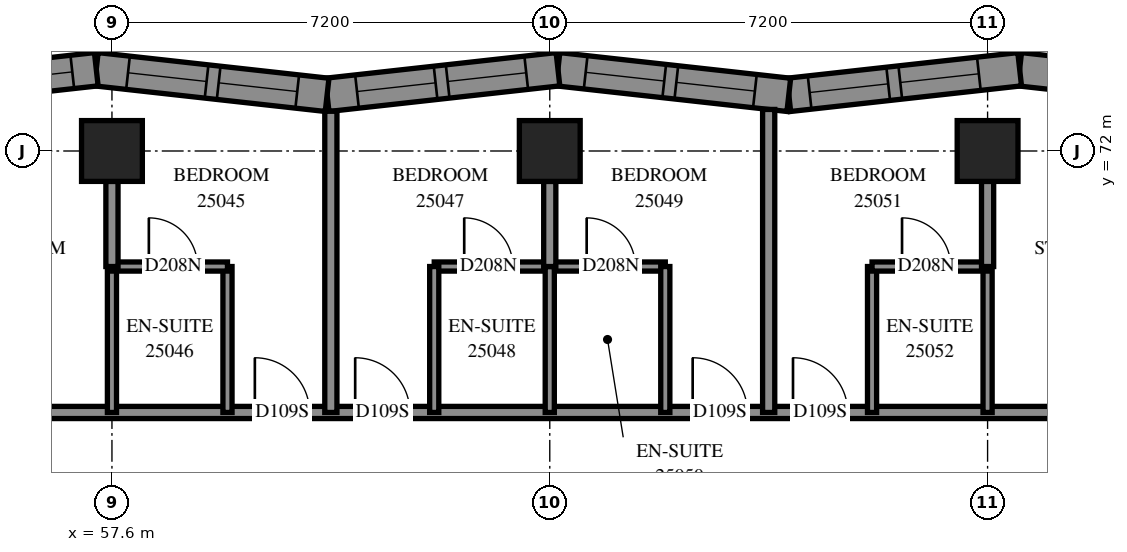
"""IFC4 building model, lengths in metres.
Left out: names, types, materials, properties, quantities, classifications, styles, units other than length and angle.
Written with IfcOpenShell. Run it as: python <this file> out.ifc"""

import sys

from ifc_helpers import new_model, si_unit, direction, frame, frame_2d, origin, origin_2d, place, context, subcontext, project, spatial, polyline, rectangle, outline, extrude, element, fill, save


model = new_model("IFC4")
c1 = context("Model", 3, precision=1e-05, world=origin(), true_north=direction((0.0, 1.0)))
c2 = subcontext(c1, "Body", "Model", "MODEL_VIEW")
j1 = project(units=[si_unit("LENGTHUNIT", "METRE"), si_unit("PLANEANGLEUNIT", "RADIAN")], contexts=[c1])
p1 = place(None, origin())
s1 = spatial("IfcSite", under=j1, at=p1, CompositionType="ELEMENT")
p2 = place(p1, origin())
s2 = spatial("IfcBuilding", under=s1, at=p2, CompositionType="ELEMENT")
p3 = place(p2, frame((0.0, 0.0, 94.8)))
s3 = spatial("IfcBuildingStorey", under=s2, at=p3, CompositionType="ELEMENT", Elevation=94.8)
for number, where, z_axis, x_axis in (
    (1, (57.6, 72.0, 0.0), (0.0, 0.0, 1.0), (1.0, 0.0, 0.0)),
    (2, (64.8, 72.0, 0.0), (0.0, 0.0, 1.0), (1.0, 0.0, 0.0)),
    (3, (72.0, 72.0, 0.0), (0.0, 0.0, 1.0), (1.0, 0.0, 0.0)),
):
    element("IfcColumn", number, at=place(p3, frame(where, z_axis=z_axis, x_axis=x_axis)), inside=s3, PredefinedType="COLUMN", context=c2, shape_type="SweptSolid", body=[
        extrude(rectangle(XDim=1.0, YDim=1.0, at=origin_2d()), origin(), (0.0, 0.0, 1.0), 3.1),
    ])
p4 = place(p3, frame((76.345, 72.921, 0.0), z_axis=(0.0, 0.0, 1.0), x_axis=(-0.9939087915, 0.1102057815, 0.0)))
e4 = element("IfcWall", 4, at=p4, inside=s3, PredefinedType="SOLIDWALL", context=c2, shape_type="SweptSolid", body=[
    extrude(outline(polyline([(0.052, -0.275), (3.872, -0.275), (3.811, 0.275), (-0.052, 0.275), (0.052, -0.275)])), origin(), (0.0, 0.0, 1.0), 3.1),
])
p5 = place(p4, frame((1.58, 0.0, 0.5)))
e5 = element("IfcOpeningElement", 5, at=p5, cuts=e4, PredefinedType="OPENING", context=c2, shape_type="SweptSolid", body=[
    extrude(rectangle(XDim=1.2, YDim=2.45, at=frame_2d((0.6, 1.225))), frame((0.0, 0.285, 0.0), z_axis=(0.0, -1.0, 0.0), x_axis=(1.0, 0.0, 0.0)), (0.0, 0.0, 1.0), 0.57),
])
p6 = place(p3, frame((72.527, 73.344, 0.0), z_axis=(0.0, 0.0, 1.0), x_axis=(-0.99390702, -0.1102217568, 0.0)))
e6 = element("IfcWall", 6, at=p6, inside=s3, PredefinedType="SOLIDWALL", context=c2, shape_type="SweptSolid", body=[
    extrude(outline(polyline([(-0.03, -0.275), (3.789, -0.275), (3.85, 0.275), (0.03, 0.275), (-0.03, -0.275)])), origin(), (0.0, 0.0, 1.0), 3.1),
])
p7 = place(p6, frame((0.675, 0.0, 0.5)))
e7 = element("IfcOpeningElement", 7, at=p7, cuts=e6, PredefinedType="OPENING", context=c2, shape_type="SweptSolid", body=[
    extrude(rectangle(XDim=1.3, YDim=2.45, at=frame_2d((0.65, 1.225))), frame((0.0, 0.285, 0.0), z_axis=(0.0, -1.0, 0.0), x_axis=(1.0, 0.0, 0.0)), (0.0, 0.0, 1.0), 0.57),
])
p8 = place(p6, frame((2.175, 0.0, 0.5)))
e8 = element("IfcOpeningElement", 8, at=p8, cuts=e6, PredefinedType="OPENING", context=c2, shape_type="SweptSolid", body=[
    extrude(rectangle(XDim=1.3, YDim=2.45, at=frame_2d((0.65, 1.225))), frame((0.0, 0.285, 0.0), z_axis=(0.0, -1.0, 0.0), x_axis=(1.0, 0.0, 0.0)), (0.0, 0.0, 1.0), 0.57),
])
p9 = place(p3, frame((68.731, 72.923, 0.0), z_axis=(0.0, 0.0, 1.0), x_axis=(-0.99390702, 0.1102217568, 0.0)))
e9 = element("IfcWall", 9, at=p9, inside=s3, PredefinedType="SOLIDWALL", context=c2, shape_type="SweptSolid", body=[
    extrude(outline(polyline([(0.03, -0.275), (3.85, -0.275), (3.789, 0.275), (-0.03, 0.275), (0.03, -0.275)])), origin(), (0.0, 0.0, 1.0), 3.1),
])
p10 = place(p9, frame((0.561, 0.0, 0.5)))
e10 = element("IfcOpeningElement", 10, at=p10, cuts=e9, PredefinedType="OPENING", context=c2, shape_type="SweptSolid", body=[
    extrude(rectangle(XDim=1.3, YDim=2.45, at=frame_2d((0.65, 1.225))), frame((0.0, 0.285, 0.0), z_axis=(0.0, -1.0, 0.0), x_axis=(1.0, 0.0, 0.0)), (0.0, 0.0, 1.0), 0.57),
])
p11 = place(p9, frame((2.061, 0.0, 0.5)))
e11 = element("IfcOpeningElement", 11, at=p11, cuts=e9, PredefinedType="OPENING", context=c2, shape_type="SweptSolid", body=[
    extrude(rectangle(XDim=1.3, YDim=2.45, at=frame_2d((0.65, 1.225))), frame((0.0, 0.285, 0.0), z_axis=(0.0, -1.0, 0.0), x_axis=(1.0, 0.0, 0.0)), (0.0, 0.0, 1.0), 0.57),
])
p12 = place(p3, frame((64.935, 73.344, 0.0), z_axis=(0.0, 0.0, 1.0), x_axis=(-0.993907338, -0.1102188888, 0.0)))
e12 = element("IfcWall", 12, at=p12, inside=s3, PredefinedType="SOLIDWALL", context=c2, shape_type="SweptSolid", body=[
    extrude(outline(polyline([(-0.03, -0.275), (3.789, -0.275), (3.85, 0.275), (0.03, 0.275), (-0.03, -0.275)])), origin(), (0.0, 0.0, 1.0), 3.1),
])
p13 = place(p12, frame((0.525, 0.0, 0.5)))
e13 = element("IfcOpeningElement", 13, at=p13, cuts=e12, PredefinedType="OPENING", context=c2, shape_type="SweptSolid", body=[
    extrude(rectangle(XDim=1.3, YDim=2.45, at=frame_2d((0.65, 1.225))), frame((0.0, 0.285, 0.0), z_axis=(0.0, -1.0, 0.0), x_axis=(1.0, 0.0, 0.0)), (0.0, 0.0, 1.0), 0.57),
])
p14 = place(p12, frame((2.025, 0.0, 0.5)))
e14 = element("IfcOpeningElement", 14, at=p14, cuts=e12, PredefinedType="OPENING", context=c2, shape_type="SweptSolid", body=[
    extrude(rectangle(XDim=1.3, YDim=2.45, at=frame_2d((0.65, 1.225))), frame((0.0, 0.285, 0.0), z_axis=(0.0, -1.0, 0.0), x_axis=(1.0, 0.0, 0.0)), (0.0, 0.0, 1.0), 0.57),
])
p15 = place(p3, frame((61.138, 72.923, 0.0), z_axis=(0.0, 0.0, 1.0), x_axis=(-0.99390702, 0.1102217568, 0.0)))
e15 = element("IfcWall", 15, at=p15, inside=s3, PredefinedType="SOLIDWALL", context=c2, shape_type="SweptSolid", body=[
    extrude(outline(polyline([(0.03, -0.275), (3.85, -0.275), (3.789, 0.275), (-0.03, 0.275), (0.03, -0.275)])), origin(), (0.0, 0.0, 1.0), 3.1),
])
p16 = place(p15, frame((0.494, 0.0, 0.5)))
e16 = element("IfcOpeningElement", 16, at=p16, cuts=e15, PredefinedType="OPENING", context=c2, shape_type="SweptSolid", body=[
    extrude(rectangle(XDim=1.3, YDim=2.45, at=frame_2d((0.65, 1.225))), frame((0.0, 0.285, 0.0), z_axis=(0.0, -1.0, 0.0), x_axis=(1.0, 0.0, 0.0)), (0.0, 0.0, 1.0), 0.57),
])
p17 = place(p15, frame((1.994, 0.0, 0.5)))
e17 = element("IfcOpeningElement", 17, at=p17, cuts=e15, PredefinedType="OPENING", context=c2, shape_type="SweptSolid", body=[
    extrude(rectangle(XDim=1.3, YDim=2.45, at=frame_2d((0.65, 1.225))), frame((0.0, 0.285, 0.0), z_axis=(0.0, -1.0, 0.0), x_axis=(1.0, 0.0, 0.0)), (0.0, 0.0, 1.0), 0.57),
])
p18 = place(p3, frame((57.342, 73.344, 0.0), z_axis=(0.0, 0.0, 1.0), x_axis=(-0.99390702, -0.1102217568, 0.0)))
e18 = element("IfcWall", 18, at=p18, inside=s3, PredefinedType="SOLIDWALL", context=c2, shape_type="SweptSolid", body=[
    extrude(outline(polyline([(-0.03, -0.275), (3.789, -0.275), (3.85, 0.275), (0.03, 0.275), (-0.03, -0.275)])), origin(), (0.0, 0.0, 1.0), 3.1),
])
p19 = place(p18, frame((0.397, 0.0, 0.5)))
e19 = element("IfcOpeningElement", 19, at=p19, cuts=e18, PredefinedType="OPENING", context=c2, shape_type="SweptSolid", body=[
    extrude(rectangle(XDim=1.3, YDim=2.45, at=frame_2d((0.65, 1.225))), frame((0.0, 0.285, 0.0), z_axis=(0.0, -1.0, 0.0), x_axis=(1.0, 0.0, 0.0)), (0.0, 0.0, 1.0), 0.57),
])
p20 = place(p18, frame((1.897, 0.0, 0.5)))
e20 = element("IfcOpeningElement", 20, at=p20, cuts=e18, PredefinedType="OPENING", context=c2, shape_type="SweptSolid", body=[
    extrude(rectangle(XDim=1.3, YDim=2.45, at=frame_2d((0.65, 1.225))), frame((0.0, 0.285, 0.0), z_axis=(0.0, -1.0, 0.0), x_axis=(1.0, 0.0, 0.0)), (0.0, 0.0, 1.0), 0.57),
])
p21 = place(p3, frame((54.7, 67.7, 0.0), z_axis=(0.0, 0.0, 1.0), x_axis=(1.0, 0.0, 0.0)))
e21 = element("IfcWall", 21, at=p21, inside=s3, PredefinedType="PARTITIONING", context=c2, shape_type="SweptSolid", body=[
    extrude(rectangle(XDim=20.2, YDim=0.2, at=frame_2d((10.1, 0.0))), origin(), (0.0, 0.0, 1.0), 3.1),
])
p22 = place(p21, frame((5.25, 0.0, 0.0)))
e22 = element("IfcOpeningElement", 22, at=p22, cuts=e21, PredefinedType="OPENING", context=c2, shape_type="SweptSolid", body=[
    extrude(rectangle(XDim=0.9, YDim=2.1, at=frame_2d((0.45, 1.05))), frame((0.0, 0.11, 0.0), z_axis=(0.0, -1.0, 0.0), x_axis=(1.0, 0.0, 0.0)), (0.0, 0.0, 1.0), 0.22),
])
p23 = place(p21, frame((6.9, 0.0, 0.0)))
e23 = element("IfcOpeningElement", 23, at=p23, cuts=e21, PredefinedType="OPENING", context=c2, shape_type="SweptSolid", body=[
    extrude(rectangle(XDim=0.9, YDim=2.1, at=frame_2d((0.45, 1.05))), frame((0.0, 0.11, 0.0), z_axis=(0.0, -1.0, 0.0), x_axis=(1.0, 0.0, 0.0)), (0.0, 0.0, 1.0), 0.22),
])
p24 = place(p21, frame((12.45, 0.0, 0.0)))
e24 = element("IfcOpeningElement", 24, at=p24, cuts=e21, PredefinedType="OPENING", context=c2, shape_type="SweptSolid", body=[
    extrude(rectangle(XDim=0.9, YDim=2.1, at=frame_2d((0.45, 1.05))), frame((0.0, 0.11, 0.0), z_axis=(0.0, -1.0, 0.0), x_axis=(1.0, 0.0, 0.0)), (0.0, 0.0, 1.0), 0.22),
])
p25 = place(p21, frame((14.1, 0.0, 0.0)))
e25 = element("IfcOpeningElement", 25, at=p25, cuts=e21, PredefinedType="OPENING", context=c2, shape_type="SweptSolid", body=[
    extrude(rectangle(XDim=0.9, YDim=2.1, at=frame_2d((0.45, 1.05))), frame((0.0, 0.11, 0.0), z_axis=(0.0, -1.0, 0.0), x_axis=(1.0, 0.0, 0.0)), (0.0, 0.0, 1.0), 0.22),
])
p26 = place(p3, frame((68.4, 67.7, 0.0), z_axis=(0.0, 0.0, 1.0), x_axis=(0.0, 1.0, 0.0)))
e26 = element("IfcWall", 26, at=p26, inside=s3, PredefinedType="PARTITIONING", context=c2, shape_type="SweptSolid", body=[
    extrude(rectangle(XDim=4.983, YDim=0.2, at=frame_2d((2.492, 0.0))), origin(), (0.0, 0.0, 1.0), 3.1),
])
p27 = place(p3, frame((61.2, 67.7, 0.0), z_axis=(0.0, 0.0, 1.0), x_axis=(0.0, 1.0, 0.0)))
e27 = element("IfcWall", 27, at=p27, inside=s3, PredefinedType="PARTITIONING", context=c2, shape_type="SweptSolid", body=[
    extrude(rectangle(XDim=4.954, YDim=0.2, at=frame_2d((2.477, 0.0))), origin(), (0.0, 0.0, 1.0), 3.1),
])
p28 = place(p3, frame((62.9, 70.1, 0.0), z_axis=(0.0, 0.0, 1.0), x_axis=(1.0, 0.0, 0.0)))
e28 = element("IfcWall", 28, at=p28, inside=s3, PredefinedType="PARTITIONING", context=c2, shape_type="SweptSolid", body=[
    extrude(rectangle(XDim=3.8, YDim=0.15, at=frame_2d((1.9, 0.0))), origin(), (0.0, 0.0, 1.0), 3.1),
])
p29 = place(p28, frame((0.493, 0.0, 0.0)))
e29 = element("IfcOpeningElement", 29, at=p29, cuts=e28, PredefinedType="OPENING", context=c2, shape_type="SweptSolid", body=[
    extrude(rectangle(XDim=0.8, YDim=2.1, at=frame_2d((0.4, 1.05))), frame((0.0, 0.085, 0.0), z_axis=(0.0, -1.0, 0.0), x_axis=(1.0, 0.0, 0.0)), (0.0, 0.0, 1.0), 0.17),
])
p30 = place(p28, frame((2.507, 0.0, 0.0)))
e30 = element("IfcOpeningElement", 30, at=p30, cuts=e28, PredefinedType="OPENING", context=c2, shape_type="SweptSolid", body=[
    extrude(rectangle(XDim=0.8, YDim=2.1, at=frame_2d((0.4, 1.05))), frame((0.0, 0.085, 0.0), z_axis=(0.0, -1.0, 0.0), x_axis=(1.0, 0.0, 0.0)), (0.0, 0.0, 1.0), 0.17),
])
for number, where, z_axis, x_axis in (
    (31, (59.5, 67.7, 0.0), (0.0, 0.0, 1.0), (0.0, 1.0, 0.0)),
    (32, (57.6, 67.7, 0.0), (0.0, 0.0, 1.0), (0.0, 1.0, 0.0)),
    (33, (62.9, 67.7, 0.0), (0.0, 0.0, 1.0), (0.0, 1.0, 0.0)),
    (34, (64.8, 67.7, 0.0), (0.0, 0.0, 1.0), (0.0, 1.0, 0.0)),
    (35, (66.7, 67.7, 0.0), (0.0, 0.0, 1.0), (0.0, 1.0, 0.0)),
    (36, (70.1, 67.7, 0.0), (0.0, 0.0, 1.0), (0.0, 1.0, 0.0)),
    (37, (72.0, 67.7, 0.0), (0.0, 0.0, 1.0), (0.0, 1.0, 0.0)),
):
    element("IfcWall", number, at=place(p3, frame(where, z_axis=z_axis, x_axis=x_axis)), inside=s3, PredefinedType="PARTITIONING", context=c2, shape_type="SweptSolid", body=[
        extrude(rectangle(XDim=2.4, YDim=0.15, at=frame_2d((1.2, 0.0))), origin(), (0.0, 0.0, 1.0), 3.1),
    ])
p31 = place(p3, frame((70.1, 70.1, 0.0), z_axis=(0.0, 0.0, 1.0), x_axis=(1.0, 0.0, 0.0)))
e38 = element("IfcWall", 38, at=p31, inside=s3, PredefinedType="PARTITIONING", context=c2, shape_type="SweptSolid", body=[
    extrude(rectangle(XDim=1.9, YDim=0.15, at=frame_2d((0.95, 0.0))), origin(), (0.0, 0.0, 1.0), 3.1),
])
p32 = place(p31, frame((0.493, 0.0, 0.0)))
e39 = element("IfcOpeningElement", 39, at=p32, cuts=e38, PredefinedType="OPENING", context=c2, shape_type="SweptSolid", body=[
    extrude(rectangle(XDim=0.8, YDim=2.1, at=frame_2d((0.4, 1.05))), frame((0.0, 0.085, 0.0), z_axis=(0.0, -1.0, 0.0), x_axis=(1.0, 0.0, 0.0)), (0.0, 0.0, 1.0), 0.17),
])
p33 = place(p3, frame((57.6, 70.1, 0.0), z_axis=(0.0, 0.0, 1.0), x_axis=(1.0, 0.0, 0.0)))
e40 = element("IfcWall", 40, at=p33, inside=s3, PredefinedType="PARTITIONING", context=c2, shape_type="SweptSolid", body=[
    extrude(rectangle(XDim=1.9, YDim=0.15, at=frame_2d((0.95, 0.0))), origin(), (0.0, 0.0, 1.0), 3.1),
])
p34 = place(p33, frame((0.607, 0.0, 0.0)))
e41 = element("IfcOpeningElement", 41, at=p34, cuts=e40, PredefinedType="OPENING", context=c2, shape_type="SweptSolid", body=[
    extrude(rectangle(XDim=0.8, YDim=2.1, at=frame_2d((0.4, 1.05))), frame((0.0, 0.085, 0.0), z_axis=(0.0, -1.0, 0.0), x_axis=(1.0, 0.0, 0.0)), (0.0, 0.0, 1.0), 0.17),
])
for number, where, z_axis, x_axis in (
    (42, (57.6, 70.1, 0.0), (0.0, 0.0, 1.0), (0.0, 1.0, 0.0)),
    (43, (64.8, 70.1, 0.0), (0.0, 0.0, 1.0), (0.0, 1.0, 0.0)),
    (44, (72.0, 70.1, 0.0), (0.0, 0.0, 1.0), (0.0, 1.0, 0.0)),
):
    element("IfcWall", number, at=place(p3, frame(where, z_axis=z_axis, x_axis=x_axis)), inside=s3, PredefinedType="PARTITIONING", context=c2, shape_type="SweptSolid", body=[
        extrude(rectangle(XDim=1.4, YDim=0.2, at=frame_2d((0.7, 0.0))), origin(), (0.0, 0.0, 1.0), 3.1),
    ])
p35 = place(p7, origin())
e45 = element("IfcWindow", 45, at=p35, inside=s3, PartitioningType="SINGLE_PANEL", PredefinedType="WINDOW", context=c2, shape_type="SweptSolid", body=[
    extrude(rectangle(XDim=1.3, YDim=2.45, at=frame_2d((0.65, 1.225))), frame((0.0, 0.155, 0.0), z_axis=(0.0, -1.0, 0.0), x_axis=(1.0, 0.0, 0.0)), (0.0, 0.0, 1.0), 0.06),
])
fill(e7, e45)
p36 = place(p8, origin())
e46 = element("IfcWindow", 46, at=p36, inside=s3, PartitioningType="SINGLE_PANEL", PredefinedType="WINDOW", context=c2, shape_type="SweptSolid", body=[
    extrude(rectangle(XDim=1.3, YDim=2.45, at=frame_2d((0.65, 1.225))), frame((0.0, 0.155, 0.0), z_axis=(0.0, -1.0, 0.0), x_axis=(1.0, 0.0, 0.0)), (0.0, 0.0, 1.0), 0.06),
])
fill(e8, e46)
p37 = place(p10, origin())
e47 = element("IfcWindow", 47, at=p37, inside=s3, PartitioningType="SINGLE_PANEL", PredefinedType="WINDOW", context=c2, shape_type="SweptSolid", body=[
    extrude(rectangle(XDim=1.3, YDim=2.45, at=frame_2d((0.65, 1.225))), frame((0.0, 0.155, 0.0), z_axis=(0.0, -1.0, 0.0), x_axis=(1.0, 0.0, 0.0)), (0.0, 0.0, 1.0), 0.06),
])
fill(e10, e47)
p38 = place(p11, origin())
e48 = element("IfcWindow", 48, at=p38, inside=s3, PartitioningType="SINGLE_PANEL", PredefinedType="WINDOW", context=c2, shape_type="SweptSolid", body=[
    extrude(rectangle(XDim=1.3, YDim=2.45, at=frame_2d((0.65, 1.225))), frame((0.0, 0.155, 0.0), z_axis=(0.0, -1.0, 0.0), x_axis=(1.0, 0.0, 0.0)), (0.0, 0.0, 1.0), 0.06),
])
fill(e11, e48)
p39 = place(p13, origin())
e49 = element("IfcWindow", 49, at=p39, inside=s3, PartitioningType="SINGLE_PANEL", PredefinedType="WINDOW", context=c2, shape_type="SweptSolid", body=[
    extrude(rectangle(XDim=1.3, YDim=2.45, at=frame_2d((0.65, 1.225))), frame((0.0, 0.155, 0.0), z_axis=(0.0, -1.0, 0.0), x_axis=(1.0, 0.0, 0.0)), (0.0, 0.0, 1.0), 0.06),
])
fill(e13, e49)
p40 = place(p14, origin())
e50 = element("IfcWindow", 50, at=p40, inside=s3, PartitioningType="SINGLE_PANEL", PredefinedType="WINDOW", context=c2, shape_type="SweptSolid", body=[
    extrude(rectangle(XDim=1.3, YDim=2.45, at=frame_2d((0.65, 1.225))), frame((0.0, 0.155, 0.0), z_axis=(0.0, -1.0, 0.0), x_axis=(1.0, 0.0, 0.0)), (0.0, 0.0, 1.0), 0.06),
])
fill(e14, e50)
p41 = place(p16, origin())
e51 = element("IfcWindow", 51, at=p41, inside=s3, PartitioningType="SINGLE_PANEL", PredefinedType="WINDOW", context=c2, shape_type="SweptSolid", body=[
    extrude(rectangle(XDim=1.3, YDim=2.45, at=frame_2d((0.65, 1.225))), frame((0.0, 0.155, 0.0), z_axis=(0.0, -1.0, 0.0), x_axis=(1.0, 0.0, 0.0)), (0.0, 0.0, 1.0), 0.06),
])
fill(e16, e51)
p42 = place(p17, origin())
e52 = element("IfcWindow", 52, at=p42, inside=s3, PartitioningType="SINGLE_PANEL", PredefinedType="WINDOW", context=c2, shape_type="SweptSolid", body=[
    extrude(rectangle(XDim=1.3, YDim=2.45, at=frame_2d((0.65, 1.225))), frame((0.0, 0.155, 0.0), z_axis=(0.0, -1.0, 0.0), x_axis=(1.0, 0.0, 0.0)), (0.0, 0.0, 1.0), 0.06),
])
fill(e17, e52)
p43 = place(p19, origin())
e53 = element("IfcWindow", 53, at=p43, inside=s3, PartitioningType="SINGLE_PANEL", PredefinedType="WINDOW", context=c2, shape_type="SweptSolid", body=[
    extrude(rectangle(XDim=1.3, YDim=2.45, at=frame_2d((0.65, 1.225))), frame((0.0, 0.155, 0.0), z_axis=(0.0, -1.0, 0.0), x_axis=(1.0, 0.0, 0.0)), (0.0, 0.0, 1.0), 0.06),
])
fill(e19, e53)
p44 = place(p22, origin())
e54 = element("IfcDoor", 54, at=p44, inside=s3, OperationType="SINGLE_SWING_RIGHT", PredefinedType="DOOR", context=c2, shape_type="SweptSolid", body=[
    extrude(rectangle(XDim=0.9, YDim=2.1, at=frame_2d((0.45, 1.05))), frame((0.0, 0.025, 0.0), z_axis=(0.0, -1.0, 0.0), x_axis=(1.0, 0.0, 0.0)), (0.0, 0.0, 1.0), 0.05),
])
fill(e22, e54)
p45 = place(p34, origin())
e55 = element("IfcDoor", 55, at=p45, inside=s3, OperationType="SINGLE_SWING_RIGHT", PredefinedType="DOOR", context=c2, shape_type="SweptSolid", body=[
    extrude(rectangle(XDim=0.8, YDim=2.1, at=frame_2d((0.4, 1.05))), frame((0.0, 0.025, 0.0), z_axis=(0.0, -1.0, 0.0), x_axis=(1.0, 0.0, 0.0)), (0.0, 0.0, 1.0), 0.05),
])
fill(e41, e55)
p46 = place(p23, origin())
e56 = element("IfcDoor", 56, at=p46, inside=s3, OperationType="SINGLE_SWING_LEFT", PredefinedType="DOOR", context=c2, shape_type="SweptSolid", body=[
    extrude(rectangle(XDim=0.9, YDim=2.1, at=frame_2d((0.45, 1.05))), frame((0.0, 0.025, 0.0), z_axis=(0.0, -1.0, 0.0), x_axis=(1.0, 0.0, 0.0)), (0.0, 0.0, 1.0), 0.05),
])
fill(e23, e56)
p47 = place(p29, origin())
e57 = element("IfcDoor", 57, at=p47, inside=s3, OperationType="SINGLE_SWING_RIGHT", PredefinedType="DOOR", context=c2, shape_type="SweptSolid", body=[
    extrude(rectangle(XDim=0.8, YDim=2.1, at=frame_2d((0.4, 1.05))), frame((0.0, 0.025, 0.0), z_axis=(0.0, -1.0, 0.0), x_axis=(1.0, 0.0, 0.0)), (0.0, 0.0, 1.0), 0.05),
])
fill(e29, e57)
p48 = place(p24, origin())
e58 = element("IfcDoor", 58, at=p48, inside=s3, OperationType="SINGLE_SWING_RIGHT", PredefinedType="DOOR", context=c2, shape_type="SweptSolid", body=[
    extrude(rectangle(XDim=0.9, YDim=2.1, at=frame_2d((0.45, 1.05))), frame((0.0, 0.025, 0.0), z_axis=(0.0, -1.0, 0.0), x_axis=(1.0, 0.0, 0.0)), (0.0, 0.0, 1.0), 0.05),
])
fill(e24, e58)
p49 = place(p30, origin())
e59 = element("IfcDoor", 59, at=p49, inside=s3, OperationType="SINGLE_SWING_RIGHT", PredefinedType="DOOR", context=c2, shape_type="SweptSolid", body=[
    extrude(rectangle(XDim=0.8, YDim=2.1, at=frame_2d((0.4, 1.05))), frame((0.0, 0.025, 0.0), z_axis=(0.0, -1.0, 0.0), x_axis=(1.0, 0.0, 0.0)), (0.0, 0.0, 1.0), 0.05),
])
fill(e30, e59)
p50 = place(p25, origin())
e60 = element("IfcDoor", 60, at=p50, inside=s3, OperationType="SINGLE_SWING_LEFT", PredefinedType="DOOR", context=c2, shape_type="SweptSolid", body=[
    extrude(rectangle(XDim=0.9, YDim=2.1, at=frame_2d((0.45, 1.05))), frame((0.0, 0.025, 0.0), z_axis=(0.0, -1.0, 0.0), x_axis=(1.0, 0.0, 0.0)), (0.0, 0.0, 1.0), 0.05),
])
fill(e25, e60)
p51 = place(p32, origin())
e61 = element("IfcDoor", 61, at=p51, inside=s3, OperationType="SINGLE_SWING_RIGHT", PredefinedType="DOOR", context=c2, shape_type="SweptSolid", body=[
    extrude(rectangle(XDim=0.8, YDim=2.1, at=frame_2d((0.4, 1.05))), frame((0.0, 0.025, 0.0), z_axis=(0.0, -1.0, 0.0), x_axis=(1.0, 0.0, 0.0)), (0.0, 0.0, 1.0), 0.05),
])
fill(e39, e61)
save(model, sys.argv[1])
